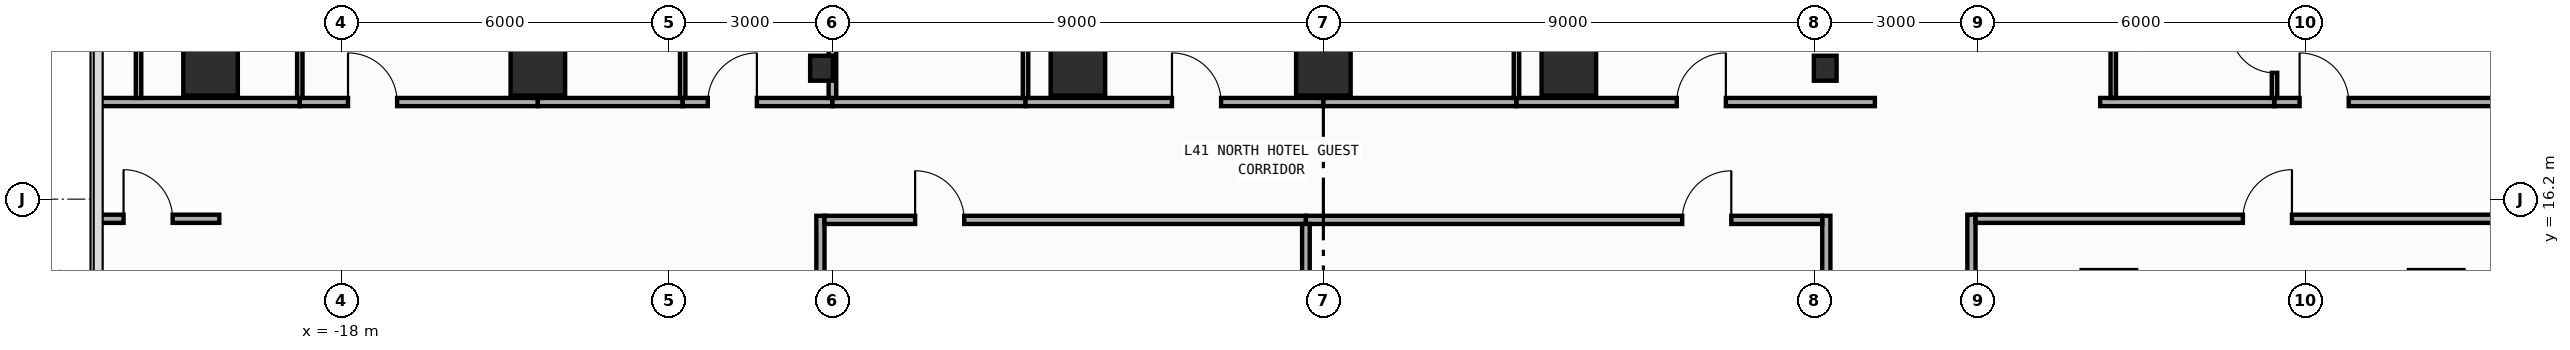
"""IFC4 building model, lengths in metres.
Left out: names, types, materials, properties, quantities, classifications, styles, units other than length and angle.
Written with IfcOpenShell. Run it as: python <this file> out.ifc"""

import sys

from ifc_helpers import new_model, si_unit, direction, frame, frame_2d, origin, origin_2d, place, context, subcontext, project, spatial, rectangle, i_section, extrude, element, fill, save


model = new_model("IFC4")
c1 = context("Model", 3, precision=1e-05, world=origin(), true_north=direction((0.0, 1.0)))
c2 = subcontext(c1, "Body", "Model", "MODEL_VIEW")
j1 = project(units=[si_unit("LENGTHUNIT", "METRE"), si_unit("PLANEANGLEUNIT", "RADIAN")], contexts=[c1])
p1 = place(None, origin())
s1 = spatial("IfcSite", under=j1, at=p1, CompositionType="ELEMENT")
p2 = place(p1, origin())
s2 = spatial("IfcBuilding", under=s1, at=p2, CompositionType="ELEMENT")
p3 = place(p2, frame((0.0, 0.0, 180.2)))
s3 = spatial("IfcBuildingStorey", under=s2, at=p3, CompositionType="ELEMENT", Elevation=180.2)
for number, where, z_axis, x_axis in (
    (1, (-9.2, 18.6, 0.0), (0.0, 0.0, 1.0), (1.0, 0.0, 0.0)),
    (2, (9.2, 18.6, 0.0), (0.0, 0.0, 1.0), (1.0, 0.0, 0.0)),
):
    element("IfcColumn", number, at=place(p3, frame(where, z_axis=z_axis, x_axis=x_axis)), inside=s3, PredefinedType="COLUMN", context=c2, shape_type="SweptSolid", body=[
        extrude(i_section(OverallWidth=0.417, OverallDepth=0.458, WebThickness=0.03, FlangeThickness=0.05, FilletRadius=0.022, at=origin_2d()), origin(), (0.0, 0.0, 1.0), 3.8),
    ])
for number, where, z_axis, x_axis in (
    (3, (-20.4, 18.6, 0.0), (0.0, 0.0, 1.0), (1.0, 0.0, 0.0)),
    (4, (-14.4, 18.6, 0.0), (0.0, 0.0, 1.0), (1.0, 0.0, 0.0)),
    (5, (-4.5, 18.6, 0.0), (0.0, 0.0, 1.0), (1.0, 0.0, 0.0)),
    (6, (0.0, 18.6, 0.0), (0.0, 0.0, 1.0), (1.0, 0.0, 0.0)),
    (7, (4.5, 18.6, 0.0), (0.0, 0.0, 1.0), (1.0, 0.0, 0.0)),
):
    element("IfcColumn", number, at=place(p3, frame(where, z_axis=z_axis, x_axis=x_axis)), inside=s3, PredefinedType="COLUMN", context=c2, shape_type="SweptSolid", body=[
        extrude(rectangle(XDim=1.0, YDim=1.0, at=origin_2d()), origin(), (0.0, 0.0, 1.0), 3.8),
    ])
p4 = place(p3, frame((-9.22, 0.5, 0.0), z_axis=(0.0, 0.0, 1.0), x_axis=(0.0, 1.0, 0.0)))
e8 = element("IfcWall", 8, at=p4, inside=s3, PredefinedType="PARTITIONING", context=c2, shape_type="SweptSolid", body=[
    extrude(rectangle(XDim=15.395, YDim=0.15, at=frame_2d((7.698, 0.0))), origin(), (0.0, 0.0, 1.0), 2.952),
])
p5 = place(p4, frame((4.512, 0.0, 0.0)))
e9 = element("IfcOpeningElement", 9, at=p5, cuts=e8, PredefinedType="OPENING", context=c2, shape_type="SweptSolid", body=[
    extrude(rectangle(XDim=0.9, YDim=2.15, at=frame_2d((0.45, 1.075))), frame((0.0, 0.085, 0.0), z_axis=(0.0, -1.0, 0.0), x_axis=(1.0, 0.0, 0.0)), (0.0, 0.0, 1.0), 0.17),
])
p6 = place(p3, frame((9.22, 0.5, 0.0), z_axis=(0.0, 0.0, 1.0), x_axis=(0.0, 1.0, 0.0)))
e10 = element("IfcWall", 10, at=p6, inside=s3, PredefinedType="PARTITIONING", context=c2, shape_type="SweptSolid", body=[
    extrude(rectangle(XDim=15.395, YDim=0.15, at=frame_2d((7.698, 0.0))), origin(), (0.0, 0.0, 1.0), 2.952),
])
p7 = place(p6, frame((4.512, 0.0, 0.0)))
e11 = element("IfcOpeningElement", 11, at=p7, cuts=e10, PredefinedType="OPENING", context=c2, shape_type="SweptSolid", body=[
    extrude(rectangle(XDim=0.9, YDim=2.15, at=frame_2d((0.45, 1.075))), frame((0.0, 0.085, 0.0), z_axis=(0.0, -1.0, 0.0), x_axis=(1.0, 0.0, 0.0)), (0.0, 0.0, 1.0), 0.17),
])
p8 = place(p3, frame((11.88, 7.16, 0.0), z_axis=(0.0, 0.0, 1.0), x_axis=(0.0, 1.0, 0.0)))
e12 = element("IfcWall", 12, at=p8, inside=s3, PredefinedType="PARTITIONING", context=c2, shape_type="SweptSolid", body=[
    extrude(rectangle(XDim=8.755, YDim=0.15, at=frame_2d((4.377, 0.0))), origin(), (0.0, 0.0, 1.0), 3.54),
])
p9 = place(p8, frame((0.46, 0.0, 0.0)))
e13 = element("IfcOpeningElement", 13, at=p9, cuts=e12, PredefinedType="OPENING", context=c2, shape_type="SweptSolid", body=[
    extrude(rectangle(XDim=0.9, YDim=2.15, at=frame_2d((0.45, 1.075))), frame((0.0, 0.085, 0.0), z_axis=(0.0, -1.0, 0.0), x_axis=(1.0, 0.0, 0.0)), (0.0, 0.0, 1.0), 0.17),
])
p10 = place(p3, frame((-9.145, 15.82, 0.0), z_axis=(0.0, 0.0, 1.0), x_axis=(1.0, 0.0, 0.0)))
e14 = element("IfcWall", 14, at=p10, inside=s3, PredefinedType="PARTITIONING", context=c2, shape_type="SweptSolid", body=[
    extrude(rectangle(XDim=8.825, YDim=0.15, at=frame_2d((4.413, 0.0))), origin(), (0.0, 0.0, 1.0), 3.54),
])
p11 = place(p10, frame((1.661, 0.0, 0.0)))
e15 = element("IfcOpeningElement", 15, at=p11, cuts=e14, PredefinedType="OPENING", context=c2, shape_type="SweptSolid", body=[
    extrude(rectangle(XDim=0.9, YDim=2.15, at=frame_2d((0.45, 1.075))), frame((0.0, 0.085, 0.0), z_axis=(0.0, -1.0, 0.0), x_axis=(1.0, 0.0, 0.0)), (0.0, 0.0, 1.0), 0.17),
])
p12 = place(p3, frame((-0.32, 15.82, 0.0), z_axis=(0.0, 0.0, 1.0), x_axis=(1.0, 0.0, 0.0)))
e16 = element("IfcWall", 16, at=p12, inside=s3, PredefinedType="PARTITIONING", context=c2, shape_type="SweptSolid", body=[
    extrude(rectangle(XDim=9.465, YDim=0.15, at=frame_2d((4.732, 0.0))), origin(), (0.0, 0.0, 1.0), 3.54),
])
p13 = place(p12, frame((6.898, 0.0, 0.0)))
e17 = element("IfcOpeningElement", 17, at=p13, cuts=e16, PredefinedType="OPENING", context=c2, shape_type="SweptSolid", body=[
    extrude(rectangle(XDim=0.9, YDim=2.15, at=frame_2d((0.45, 1.075))), frame((0.0, 0.085, 0.0), z_axis=(0.0, -1.0, 0.0), x_axis=(1.0, 0.0, 0.0)), (0.0, 0.0, 1.0), 0.17),
])
p14 = place(p3, frame((-22.455, 17.98, 0.0), z_axis=(0.0, 0.0, 1.0), x_axis=(1.0, 0.0, 0.0)))
e18 = element("IfcWall", 18, at=p14, inside=s3, PredefinedType="PARTITIONING", context=c2, shape_type="SweptSolid", body=[
    extrude(rectangle(XDim=3.691, YDim=0.15, at=frame_2d((1.846, 0.0))), origin(), (0.0, 0.0, 1.0), 3.54),
])
p15 = place(p3, frame((-18.764, 17.98, 0.0), z_axis=(0.0, 0.0, 1.0), x_axis=(1.0, 0.0, 0.0)))
e19 = element("IfcWall", 19, at=p15, inside=s3, PredefinedType="PARTITIONING", context=c2, shape_type="SweptSolid", body=[
    extrude(rectangle(XDim=4.364, YDim=0.15, at=frame_2d((2.182, 0.0))), origin(), (0.0, 0.0, 1.0), 3.54),
])
p16 = place(p15, frame((0.884, 0.0, 0.0)))
e20 = element("IfcOpeningElement", 20, at=p16, cuts=e19, PredefinedType="OPENING", context=c2, shape_type="SweptSolid", body=[
    extrude(rectangle(XDim=0.9, YDim=2.15, at=frame_2d((0.45, 1.075))), frame((0.0, 0.085, 0.0), z_axis=(0.0, -1.0, 0.0), x_axis=(1.0, 0.0, 0.0)), (0.0, 0.0, 1.0), 0.17),
])
p17 = place(p3, frame((-14.4, 17.98, 0.0), z_axis=(0.0, 0.0, 1.0), x_axis=(1.0, 0.0, 0.0)))
e21 = element("IfcWall", 21, at=p17, inside=s3, PredefinedType="PARTITIONING", context=c2, shape_type="SweptSolid", body=[
    extrude(rectangle(XDim=2.655, YDim=0.15, at=frame_2d((1.327, 0.0))), origin(), (0.0, 0.0, 1.0), 3.54),
])
p18 = place(p3, frame((-11.745, 17.98, 0.0), z_axis=(0.0, 0.0, 1.0), x_axis=(1.0, 0.0, 0.0)))
e22 = element("IfcWall", 22, at=p18, inside=s3, PredefinedType="PARTITIONING", context=c2, shape_type="SweptSolid", body=[
    extrude(rectangle(XDim=2.745, YDim=0.15, at=frame_2d((1.373, 0.0))), origin(), (0.0, 0.0, 1.0), 3.54),
])
p19 = place(p18, frame((0.46, 0.0, 0.0)))
e23 = element("IfcOpeningElement", 23, at=p19, cuts=e22, PredefinedType="OPENING", context=c2, shape_type="SweptSolid", body=[
    extrude(rectangle(XDim=0.9, YDim=2.15, at=frame_2d((0.45, 1.075))), frame((0.0, 0.085, 0.0), z_axis=(0.0, -1.0, 0.0), x_axis=(1.0, 0.0, 0.0)), (0.0, 0.0, 1.0), 0.17),
])
p20 = place(p3, frame((-9.0, 17.98, 0.0), z_axis=(0.0, 0.0, 1.0), x_axis=(1.0, 0.0, 0.0)))
e24 = element("IfcWall", 24, at=p20, inside=s3, PredefinedType="PARTITIONING", context=c2, shape_type="SweptSolid", body=[
    extrude(rectangle(XDim=3.54, YDim=0.15, at=frame_2d((1.77, 0.0))), origin(), (0.0, 0.0, 1.0), 3.54),
])
p21 = place(p3, frame((-5.46, 17.98, 0.0), z_axis=(0.0, 0.0, 1.0), x_axis=(1.0, 0.0, 0.0)))
e25 = element("IfcWall", 25, at=p21, inside=s3, PredefinedType="PARTITIONING", context=c2, shape_type="SweptSolid", body=[
    extrude(rectangle(XDim=5.46, YDim=0.15, at=frame_2d((2.73, 0.0))), origin(), (0.0, 0.0, 1.0), 3.54),
])
p22 = place(p21, frame((2.684, 0.0, 0.0)))
e26 = element("IfcOpeningElement", 26, at=p22, cuts=e25, PredefinedType="OPENING", context=c2, shape_type="SweptSolid", body=[
    extrude(rectangle(XDim=0.9, YDim=2.15, at=frame_2d((0.45, 1.075))), frame((0.0, 0.085, 0.0), z_axis=(0.0, -1.0, 0.0), x_axis=(1.0, 0.0, 0.0)), (0.0, 0.0, 1.0), 0.17),
])
p23 = place(p3, frame((0.0, 17.98, 0.0), z_axis=(0.0, 0.0, 1.0), x_axis=(1.0, 0.0, 0.0)))
e27 = element("IfcWall", 27, at=p23, inside=s3, PredefinedType="PARTITIONING", context=c2, shape_type="SweptSolid", body=[
    extrude(rectangle(XDim=3.54, YDim=0.15, at=frame_2d((1.77, 0.0))), origin(), (0.0, 0.0, 1.0), 3.54),
])
p24 = place(p3, frame((3.54, 17.98, 0.0), z_axis=(0.0, 0.0, 1.0), x_axis=(1.0, 0.0, 0.0)))
e28 = element("IfcWall", 28, at=p24, inside=s3, PredefinedType="PARTITIONING", context=c2, shape_type="SweptSolid", body=[
    extrude(rectangle(XDim=6.57, YDim=0.15, at=frame_2d((3.285, 0.0))), origin(), (0.0, 0.0, 1.0), 3.54),
])
p25 = place(p24, frame((2.938, 0.0, 0.0)))
e29 = element("IfcOpeningElement", 29, at=p25, cuts=e28, PredefinedType="OPENING", context=c2, shape_type="SweptSolid", body=[
    extrude(rectangle(XDim=0.9, YDim=2.15, at=frame_2d((0.45, 1.075))), frame((0.0, 0.085, 0.0), z_axis=(0.0, -1.0, 0.0), x_axis=(1.0, 0.0, 0.0)), (0.0, 0.0, 1.0), 0.17),
])
p26 = place(p3, frame((14.24, 17.98, 0.0), z_axis=(0.0, 0.0, 1.0), x_axis=(1.0, 0.0, 0.0)))
e30 = element("IfcWall", 30, at=p26, inside=s3, PredefinedType="PARTITIONING", context=c2, shape_type="SweptSolid", body=[
    extrude(rectangle(XDim=3.196, YDim=0.15, at=frame_2d((1.598, 0.0))), origin(), (0.0, 0.0, 1.0), 3.54),
])
p27 = place(p3, frame((17.436, 17.98, 0.0), z_axis=(0.0, 0.0, 1.0), x_axis=(1.0, 0.0, 0.0)))
e31 = element("IfcWall", 31, at=p27, inside=s3, PredefinedType="PARTITIONING", context=c2, shape_type="SweptSolid", body=[
    extrude(rectangle(XDim=5.019, YDim=0.15, at=frame_2d((2.51, 0.0))), origin(), (0.0, 0.0, 1.0), 3.54),
])
p28 = place(p27, frame((0.46, 0.0, 0.0)))
e32 = element("IfcOpeningElement", 32, at=p28, cuts=e31, PredefinedType="OPENING", context=c2, shape_type="SweptSolid", body=[
    extrude(rectangle(XDim=0.9, YDim=2.15, at=frame_2d((0.45, 1.075))), frame((0.0, 0.085, 0.0), z_axis=(0.0, -1.0, 0.0), x_axis=(1.0, 0.0, 0.0)), (0.0, 0.0, 1.0), 0.17),
])
p29 = place(p3, frame((11.955, 15.84, 0.0), z_axis=(0.0, 0.0, 1.0), x_axis=(1.0, 0.0, 0.0)))
e33 = element("IfcWall", 33, at=p29, inside=s3, PredefinedType="PARTITIONING", context=c2, shape_type="SweptSolid", body=[
    extrude(rectangle(XDim=10.5, YDim=0.15, at=frame_2d((5.25, 0.0))), origin(), (0.0, 0.0, 1.0), 3.54),
])
p30 = place(p29, frame((4.901, 0.0, 0.0)))
e34 = element("IfcOpeningElement", 34, at=p30, cuts=e33, PredefinedType="OPENING", context=c2, shape_type="SweptSolid", body=[
    extrude(rectangle(XDim=0.9, YDim=2.15, at=frame_2d((0.45, 1.075))), frame((0.0, 0.085, 0.0), z_axis=(0.0, -1.0, 0.0), x_axis=(1.0, 0.0, 0.0)), (0.0, 0.0, 1.0), 0.17),
])
p31 = place(p3, frame((-22.455, 15.84, 0.0), z_axis=(0.0, 0.0, 1.0), x_axis=(1.0, 0.0, 0.0)))
e35 = element("IfcWall", 35, at=p31, inside=s3, PredefinedType="PARTITIONING", context=c2, shape_type="SweptSolid", body=[
    extrude(rectangle(XDim=2.215, YDim=0.15, at=frame_2d((1.107, 0.0))), origin(), (0.0, 0.0, 1.0), 3.54),
])
p32 = place(p31, frame((0.46, 0.0, 0.0)))
e36 = element("IfcOpeningElement", 36, at=p32, cuts=e35, PredefinedType="OPENING", context=c2, shape_type="SweptSolid", body=[
    extrude(rectangle(XDim=0.9, YDim=2.15, at=frame_2d((0.45, 1.075))), frame((0.0, 0.085, 0.0), z_axis=(0.0, -1.0, 0.0), x_axis=(1.0, 0.0, 0.0)), (0.0, 0.0, 1.0), 0.17),
])
p33 = place(p3, frame((-0.32, 0.57, 0.0), z_axis=(0.0, 0.0, 1.0), x_axis=(0.0, 1.0, 0.0)))
e37 = element("IfcWall", 37, at=p33, inside=s3, PredefinedType="PARTITIONING", context=c2, shape_type="SweptSolid", body=[
    extrude(rectangle(XDim=15.175, YDim=0.14, at=frame_2d((7.587, 0.0))), origin(), (0.0, 0.0, 1.0), 3.54),
])
p34 = place(p3, frame((-18.764, 18.055, 0.0), z_axis=(0.0, 0.0, 1.0), x_axis=(0.0, 1.0, 0.0)))
e38 = element("IfcWall", 38, at=p34, inside=s3, PredefinedType="PARTITIONING", context=c2, shape_type="SweptSolid", body=[
    extrude(rectangle(XDim=2.965, YDim=0.1, at=frame_2d((1.482, 0.0))), origin(), (0.0, 0.0, 1.0), 3.54),
])
p35 = place(p34, frame((1.705, 0.0, 0.0)))
e39 = element("IfcOpeningElement", 39, at=p35, cuts=e38, PredefinedType="OPENING", context=c2, shape_type="SweptSolid", body=[
    extrude(rectangle(XDim=0.8, YDim=2.1, at=frame_2d((0.4, 1.05))), frame((0.0, 0.06, 0.0), z_axis=(0.0, -1.0, 0.0), x_axis=(1.0, 0.0, 0.0)), (0.0, 0.0, 1.0), 0.12),
])
p36 = place(p3, frame((-14.4, 18.055, 0.0), z_axis=(0.0, 0.0, 1.0), x_axis=(0.0, 1.0, 0.0)))
e40 = element("IfcWall", 40, at=p36, inside=s3, PredefinedType="PARTITIONING", context=c2, shape_type="SweptSolid", body=[
    extrude(rectangle(XDim=3.015, YDim=0.14, at=frame_2d((1.508, 0.0))), origin(), (0.0, 0.0, 1.0), 2.952),
])
p37 = place(p3, frame((-11.745, 18.055, 0.0), z_axis=(0.0, 0.0, 1.0), x_axis=(0.0, 1.0, 0.0)))
e41 = element("IfcWall", 41, at=p37, inside=s3, PredefinedType="PARTITIONING", context=c2, shape_type="SweptSolid", body=[
    extrude(rectangle(XDim=2.965, YDim=0.1, at=frame_2d((1.482, 0.0))), origin(), (0.0, 0.0, 1.0), 3.54),
])
p38 = place(p37, frame((1.705, 0.0, 0.0)))
e42 = element("IfcOpeningElement", 42, at=p38, cuts=e41, PredefinedType="OPENING", context=c2, shape_type="SweptSolid", body=[
    extrude(rectangle(XDim=0.8, YDim=2.1, at=frame_2d((0.4, 1.05))), frame((0.0, 0.06, 0.0), z_axis=(0.0, -1.0, 0.0), x_axis=(1.0, 0.0, 0.0)), (0.0, 0.0, 1.0), 0.12),
])
p39 = place(p3, frame((-9.0, 18.055, 0.0), z_axis=(0.0, 0.0, 1.0), x_axis=(0.0, 1.0, 0.0)))
e43 = element("IfcWall", 43, at=p39, inside=s3, PredefinedType="PARTITIONING", context=c2, shape_type="SweptSolid", body=[
    extrude(rectangle(XDim=3.015, YDim=0.14, at=frame_2d((1.508, 0.0))), origin(), (0.0, 0.0, 1.0), 2.952),
])
p40 = place(p3, frame((-5.46, 18.055, 0.0), z_axis=(0.0, 0.0, 1.0), x_axis=(0.0, 1.0, 0.0)))
e44 = element("IfcWall", 44, at=p40, inside=s3, PredefinedType="PARTITIONING", context=c2, shape_type="SweptSolid", body=[
    extrude(rectangle(XDim=2.965, YDim=0.1, at=frame_2d((1.482, 0.0))), origin(), (0.0, 0.0, 1.0), 3.54),
])
p41 = place(p40, frame((1.705, 0.0, 0.0)))
e45 = element("IfcOpeningElement", 45, at=p41, cuts=e44, PredefinedType="OPENING", context=c2, shape_type="SweptSolid", body=[
    extrude(rectangle(XDim=0.8, YDim=2.1, at=frame_2d((0.4, 1.05))), frame((0.0, 0.06, 0.0), z_axis=(0.0, -1.0, 0.0), x_axis=(1.0, 0.0, 0.0)), (0.0, 0.0, 1.0), 0.12),
])
p42 = place(p3, frame((0.0, 18.055, 0.0), z_axis=(0.0, 0.0, 1.0), x_axis=(0.0, 1.0, 0.0)))
e46 = element("IfcWall", 46, at=p42, inside=s3, PredefinedType="PARTITIONING", context=c2, shape_type="SweptSolid", body=[
    extrude(rectangle(XDim=3.015, YDim=0.14, at=frame_2d((1.508, 0.0))), origin(), (0.0, 0.0, 1.0), 3.54),
])
p43 = place(p3, frame((3.54, 18.055, 0.0), z_axis=(0.0, 0.0, 1.0), x_axis=(0.0, 1.0, 0.0)))
e47 = element("IfcWall", 47, at=p43, inside=s3, PredefinedType="PARTITIONING", context=c2, shape_type="SweptSolid", body=[
    extrude(rectangle(XDim=2.965, YDim=0.1, at=frame_2d((1.482, 0.0))), origin(), (0.0, 0.0, 1.0), 3.54),
])
p44 = place(p43, frame((1.705, 0.0, 0.0)))
e48 = element("IfcOpeningElement", 48, at=p44, cuts=e47, PredefinedType="OPENING", context=c2, shape_type="SweptSolid", body=[
    extrude(rectangle(XDim=0.8, YDim=2.1, at=frame_2d((0.4, 1.05))), frame((0.0, 0.06, 0.0), z_axis=(0.0, -1.0, 0.0), x_axis=(1.0, 0.0, 0.0)), (0.0, 0.0, 1.0), 0.12),
])
p45 = place(p3, frame((17.436, 18.055, 0.0), z_axis=(0.0, 0.0, 1.0), x_axis=(0.0, 1.0, 0.0)))
e49 = element("IfcWall", 49, at=p45, inside=s3, PredefinedType="PARTITIONING", context=c2, shape_type="SweptSolid", body=[
    extrude(rectangle(XDim=2.965, YDim=0.1, at=frame_2d((1.482, 0.0))), origin(), (0.0, 0.0, 1.0), 3.54),
])
p46 = place(p45, frame((0.46, 0.0, 0.0)))
e50 = element("IfcOpeningElement", 50, at=p46, cuts=e49, PredefinedType="OPENING", context=c2, shape_type="SweptSolid", body=[
    extrude(rectangle(XDim=0.8, YDim=2.1, at=frame_2d((0.4, 1.05))), frame((0.0, 0.06, 0.0), z_axis=(0.0, -1.0, 0.0), x_axis=(1.0, 0.0, 0.0)), (0.0, 0.0, 1.0), 0.12),
])
p47 = place(p3, frame((-21.72, 18.055, 0.0), z_axis=(0.0, 0.0, 1.0), x_axis=(0.0, 1.0, 0.0)))
e51 = element("IfcWall", 51, at=p47, inside=s3, PredefinedType="PARTITIONING", context=c2, shape_type="SweptSolid", body=[
    extrude(rectangle(XDim=2.965, YDim=0.1, at=frame_2d((1.482, 0.0))), origin(), (0.0, 0.0, 1.0), 3.54),
])
p48 = place(p3, frame((14.48, 18.055, 0.0), z_axis=(0.0, 0.0, 1.0), x_axis=(0.0, 1.0, 0.0)))
e52 = element("IfcWall", 52, at=p48, inside=s3, PredefinedType="PARTITIONING", context=c2, shape_type="SweptSolid", body=[
    extrude(rectangle(XDim=2.965, YDim=0.1, at=frame_2d((1.482, 0.0))), origin(), (0.0, 0.0, 1.0), 2.952),
])
p49 = place(p11, origin())
e53 = element("IfcDoor", 53, at=p49, inside=s3, OperationType="SINGLE_SWING_LEFT", PredefinedType="DOOR", context=c2, shape_type="SweptSolid", body=[
    extrude(rectangle(XDim=0.9, YDim=2.15, at=frame_2d((0.45, 1.075))), frame((0.0, 0.025, 0.0), z_axis=(0.0, -1.0, 0.0), x_axis=(1.0, 0.0, 0.0)), (0.0, 0.0, 1.0), 0.05),
])
fill(e15, e53)
p50 = place(p13, origin())
e54 = element("IfcDoor", 54, at=p50, inside=s3, OperationType="SINGLE_SWING_RIGHT", PredefinedType="DOOR", context=c2, shape_type="SweptSolid", body=[
    extrude(rectangle(XDim=0.9, YDim=2.15, at=frame_2d((0.45, 1.075))), frame((0.0, 0.025, 0.0), z_axis=(0.0, -1.0, 0.0), x_axis=(1.0, 0.0, 0.0)), (0.0, 0.0, 1.0), 0.05),
])
fill(e17, e54)
p51 = place(p16, origin())
e55 = element("IfcDoor", 55, at=p51, inside=s3, OperationType="SINGLE_SWING_LEFT", PredefinedType="DOOR", context=c2, shape_type="SweptSolid", body=[
    extrude(rectangle(XDim=0.9, YDim=2.15, at=frame_2d((0.45, 1.075))), frame((0.0, 0.025, 0.0), z_axis=(0.0, -1.0, 0.0), x_axis=(1.0, 0.0, 0.0)), (0.0, 0.0, 1.0), 0.05),
])
fill(e20, e55)
p52 = place(p19, origin())
e56 = element("IfcDoor", 56, at=p52, inside=s3, OperationType="SINGLE_SWING_RIGHT", PredefinedType="DOOR", context=c2, shape_type="SweptSolid", body=[
    extrude(rectangle(XDim=0.9, YDim=2.15, at=frame_2d((0.45, 1.075))), frame((0.0, 0.025, 0.0), z_axis=(0.0, -1.0, 0.0), x_axis=(1.0, 0.0, 0.0)), (0.0, 0.0, 1.0), 0.05),
])
fill(e23, e56)
p53 = place(p22, origin())
e57 = element("IfcDoor", 57, at=p53, inside=s3, OperationType="SINGLE_SWING_LEFT", PredefinedType="DOOR", context=c2, shape_type="SweptSolid", body=[
    extrude(rectangle(XDim=0.9, YDim=2.15, at=frame_2d((0.45, 1.075))), frame((0.0, 0.025, 0.0), z_axis=(0.0, -1.0, 0.0), x_axis=(1.0, 0.0, 0.0)), (0.0, 0.0, 1.0), 0.05),
])
fill(e26, e57)
p54 = place(p25, origin())
e58 = element("IfcDoor", 58, at=p54, inside=s3, OperationType="SINGLE_SWING_RIGHT", PredefinedType="DOOR", context=c2, shape_type="SweptSolid", body=[
    extrude(rectangle(XDim=0.9, YDim=2.15, at=frame_2d((0.45, 1.075))), frame((0.0, 0.025, 0.0), z_axis=(0.0, -1.0, 0.0), x_axis=(1.0, 0.0, 0.0)), (0.0, 0.0, 1.0), 0.05),
])
fill(e29, e58)
p55 = place(p28, origin())
e59 = element("IfcDoor", 59, at=p55, inside=s3, OperationType="SINGLE_SWING_LEFT", PredefinedType="DOOR", context=c2, shape_type="SweptSolid", body=[
    extrude(rectangle(XDim=0.9, YDim=2.15, at=frame_2d((0.45, 1.075))), frame((0.0, 0.025, 0.0), z_axis=(0.0, -1.0, 0.0), x_axis=(1.0, 0.0, 0.0)), (0.0, 0.0, 1.0), 0.05),
])
fill(e32, e59)
p56 = place(p30, origin())
e60 = element("IfcDoor", 60, at=p56, inside=s3, OperationType="SINGLE_SWING_RIGHT", PredefinedType="DOOR", context=c2, shape_type="SweptSolid", body=[
    extrude(rectangle(XDim=0.9, YDim=2.15, at=frame_2d((0.45, 1.075))), frame((0.0, 0.025, 0.0), z_axis=(0.0, -1.0, 0.0), x_axis=(1.0, 0.0, 0.0)), (0.0, 0.0, 1.0), 0.05),
])
fill(e34, e60)
p57 = place(p32, origin())
e61 = element("IfcDoor", 61, at=p57, inside=s3, OperationType="SINGLE_SWING_LEFT", PredefinedType="DOOR", context=c2, shape_type="SweptSolid", body=[
    extrude(rectangle(XDim=0.9, YDim=2.15, at=frame_2d((0.45, 1.075))), frame((0.0, 0.025, 0.0), z_axis=(0.0, -1.0, 0.0), x_axis=(1.0, 0.0, 0.0)), (0.0, 0.0, 1.0), 0.05),
])
fill(e36, e61)
p58 = place(p46, origin())
e62 = element("IfcDoor", 62, at=p58, inside=s3, OperationType="SINGLE_SWING_RIGHT", PredefinedType="DOOR", context=c2, shape_type="SweptSolid", body=[
    extrude(rectangle(XDim=0.8, YDim=2.1, at=frame_2d((0.4, 1.05))), frame((0.0, 0.025, 0.0), z_axis=(0.0, -1.0, 0.0), x_axis=(1.0, 0.0, 0.0)), (0.0, 0.0, 1.0), 0.05),
])
fill(e50, e62)
save(model, sys.argv[1])
